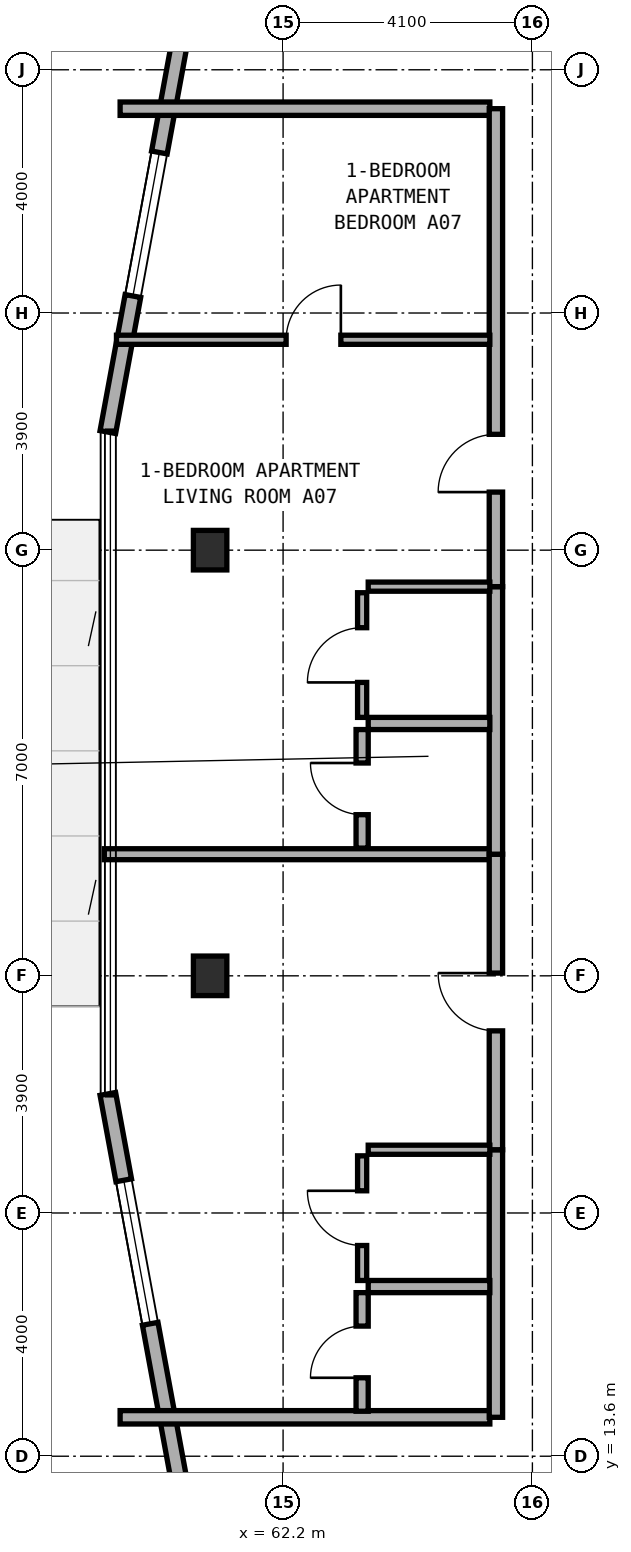
"""IFC4 building model, lengths in metres.
Left out: names, types, materials, properties, quantities, classifications, styles, units other than length and angle.
Written with IfcOpenShell. Run it as: python <this file> out.ifc"""

import sys

from ifc_helpers import new_model, si_unit, direction, frame, frame_2d, origin, origin_2d, place, context, subcontext, project, spatial, rectangle, extrude, element, fill, save


model = new_model("IFC4")
c1 = context("Model", 3, precision=1e-05, world=origin(), true_north=direction((0.0, 1.0)))
c2 = subcontext(c1, "Body", "Model", "MODEL_VIEW")
j1 = project(units=[si_unit("LENGTHUNIT", "METRE"), si_unit("PLANEANGLEUNIT", "RADIAN")], contexts=[c1])
p1 = place(None, origin())
s1 = spatial("IfcSite", under=j1, at=p1, CompositionType="ELEMENT")
p2 = place(p1, origin())
s2 = spatial("IfcBuilding", under=s1, at=p2, CompositionType="ELEMENT")
p3 = place(p2, frame((0.0, 0.0, 124.0)))
s3 = spatial("IfcBuildingStorey", under=s2, at=p3, CompositionType="ELEMENT", Elevation=124.0)
for number, where, z_axis, x_axis in (
    (1, (61.0, 21.5, 0.0), (0.0, 0.0, 1.0), (1.0, 0.0, 0.0)),
    (2, (61.0, 28.5, 0.0), (0.0, 0.0, 1.0), (1.0, 0.0, 0.0)),
):
    element("IfcColumn", number, at=place(p3, frame(where, z_axis=z_axis, x_axis=x_axis)), inside=s3, PredefinedType="COLUMN", context=c2, shape_type="SweptSolid", body=[
        extrude(rectangle(XDim=0.55, YDim=0.65, at=origin_2d()), origin(), (0.0, 0.0, 1.0), 3.5),
    ])
p4 = place(p3, frame((60.929, 39.184, 0.0), z_axis=(0.0, 0.0, 1.0), x_axis=(-0.181209963057, -0.983444431215, 0.0)))
e3 = element("IfcWall", 3, at=p4, inside=s3, PredefinedType="STANDARD", context=c2, shape_type="SweptSolid", body=[
    extrude(rectangle(XDim=8.889, YDim=0.26, at=frame_2d((4.445, 0.0))), origin(), (0.0, 0.0, 1.0), 3.25),
])
p5 = place(p4, frame((4.214, 0.0, 0.8)))
e4 = element("IfcOpeningElement", 4, at=p5, cuts=e3, PredefinedType="OPENING", context=c2, shape_type="SweptSolid", body=[
    extrude(rectangle(XDim=2.4, YDim=1.6, at=frame_2d((1.2, 0.8))), frame((0.0, 0.14, 0.0), z_axis=(0.0, -1.0, 0.0), x_axis=(1.0, 0.0, 0.0)), (0.0, 0.0, 1.0), 0.28),
])
p6 = place(p3, frame((59.318, 19.558, 0.0), z_axis=(0.0, 0.0, 1.0), x_axis=(0.181209963057, -0.983444431215, 0.0)))
e5 = element("IfcWall", 5, at=p6, inside=s3, PredefinedType="STANDARD", context=c2, shape_type="SweptSolid", body=[
    extrude(rectangle(XDim=8.889, YDim=0.26, at=frame_2d((4.445, 0.0))), origin(), (0.0, 0.0, 1.0), 3.25),
])
p7 = place(p6, frame((1.444, 0.0, 0.8)))
e6 = element("IfcOpeningElement", 6, at=p7, cuts=e5, PredefinedType="OPENING", context=c2, shape_type="SweptSolid", body=[
    extrude(rectangle(XDim=2.4, YDim=1.6, at=frame_2d((1.2, 0.8))), frame((0.0, 0.14, 0.0), z_axis=(0.0, -1.0, 0.0), x_axis=(1.0, 0.0, 0.0)), (0.0, 0.0, 1.0), 0.28),
])
for number, where, z_axis, x_axis in (
    (7, (59.52, 14.24, 0.0), (0.0, 0.0, 1.0), (1.0, 0.0, 0.0)),
    (8, (59.52, 35.76, 0.0), (0.0, 0.0, 1.0), (1.0, 0.0, 0.0)),
):
    element("IfcWall", number, at=place(p3, frame(where, z_axis=z_axis, x_axis=x_axis)), inside=s3, PredefinedType="SOLIDWALL", context=c2, shape_type="SweptSolid", body=[
        extrude(rectangle(XDim=6.08, YDim=0.22, at=frame_2d((3.04, 0.0))), origin(), (0.0, 0.0, 1.0), 2.945),
    ])
p8 = place(p3, frame((59.26, 23.5, 0.0), z_axis=(0.0, 0.0, 1.0), x_axis=(1.0, 0.0, 0.0)))
e9 = element("IfcWall", 9, at=p8, inside=s3, PredefinedType="SOLIDWALL", context=c2, shape_type="SweptSolid", body=[
    extrude(rectangle(XDim=6.44, YDim=0.18, at=frame_2d((3.22, 0.0))), origin(), (0.0, 0.0, 1.0), 2.945),
])
p9 = place(p3, frame((65.7, 14.24, 0.0), z_axis=(0.0, 0.0, 1.0), x_axis=(0.0, 1.0, 0.0)))
e10 = element("IfcWall", 10, at=p9, inside=s3, PredefinedType="SOLIDWALL", context=c2, shape_type="SweptSolid", body=[
    extrude(rectangle(XDim=4.4, YDim=0.22, at=frame_2d((2.2, 0.0))), origin(), (0.0, 0.0, 1.0), 3.22),
])
p10 = place(p3, frame((65.7, 18.64, 0.0), z_axis=(0.0, 0.0, 1.0), x_axis=(0.0, 1.0, 0.0)))
e11 = element("IfcWall", 11, at=p10, inside=s3, PredefinedType="SOLIDWALL", context=c2, shape_type="SweptSolid", body=[
    extrude(rectangle(XDim=4.86, YDim=0.22, at=frame_2d((2.43, 0.0))), origin(), (0.0, 0.0, 1.0), 2.825),
])
p11 = place(p10, frame((1.955, 0.0, 0.0)))
e12 = element("IfcOpeningElement", 12, at=p11, cuts=e11, PredefinedType="OPENING", context=c2, shape_type="SweptSolid", body=[
    extrude(rectangle(XDim=0.95, YDim=2.1, at=frame_2d((0.475, 1.05))), frame((0.0, 0.12, 0.0), z_axis=(0.0, -1.0, 0.0), x_axis=(1.0, 0.0, 0.0)), (0.0, 0.0, 1.0), 0.24),
])
p12 = place(p3, frame((63.6, 16.39, 0.0), z_axis=(0.0, 0.0, 1.0), x_axis=(1.0, 0.0, 0.0)))
e13 = element("IfcWall", 13, at=p12, inside=s3, PredefinedType="PLUMBINGWALL", context=c2, shape_type="SweptSolid", body=[
    extrude(rectangle(XDim=2.0, YDim=0.2, at=frame_2d((1.0, 0.0))), origin(), (0.0, 0.0, 1.0), 3.22),
])
p13 = place(p3, frame((63.6, 18.64, 0.0), z_axis=(0.0, 0.0, 1.0), x_axis=(1.0, 0.0, 0.0)))
e14 = element("IfcWall", 14, at=p13, inside=s3, PredefinedType="PARTITIONING", context=c2, shape_type="SweptSolid", body=[
    extrude(rectangle(XDim=2.0, YDim=0.15, at=frame_2d((1.0, 0.0))), origin(), (0.0, 0.0, 1.0), 3.22),
])
p14 = place(p3, frame((63.5, 14.34, 0.0), z_axis=(0.0, 0.0, 1.0), x_axis=(0.0, 1.0, 0.0)))
e15 = element("IfcWall", 15, at=p14, inside=s3, PredefinedType="PLUMBINGWALL", context=c2, shape_type="SweptSolid", body=[
    extrude(rectangle(XDim=1.95, YDim=0.2, at=frame_2d((0.975, 0.0))), origin(), (0.0, 0.0, 1.0), 3.22),
])
p15 = place(p14, frame((0.55, 0.0, 0.0)))
e16 = element("IfcOpeningElement", 16, at=p15, cuts=e15, PredefinedType="OPENING", context=c2, shape_type="SweptSolid", body=[
    extrude(rectangle(XDim=0.85, YDim=2.1, at=frame_2d((0.425, 1.05))), frame((0.0, 0.11, 0.0), z_axis=(0.0, -1.0, 0.0), x_axis=(1.0, 0.0, 0.0)), (0.0, 0.0, 1.0), 0.22),
])
p16 = place(p3, frame((63.5, 16.49, 0.0), z_axis=(0.0, 0.0, 1.0), x_axis=(0.0, 1.0, 0.0)))
e17 = element("IfcWall", 17, at=p16, inside=s3, PredefinedType="PARTITIONING", context=c2, shape_type="SweptSolid", body=[
    extrude(rectangle(XDim=2.05, YDim=0.15, at=frame_2d((1.025, 0.0))), origin(), (0.0, 0.0, 1.0), 3.22),
])
p17 = place(p16, frame((0.575, 0.0, 0.0)))
e18 = element("IfcOpeningElement", 18, at=p17, cuts=e17, PredefinedType="OPENING", context=c2, shape_type="SweptSolid", body=[
    extrude(rectangle(XDim=0.9, YDim=2.1, at=frame_2d((0.45, 1.05))), frame((0.0, 0.085, 0.0), z_axis=(0.0, -1.0, 0.0), x_axis=(1.0, 0.0, 0.0)), (0.0, 0.0, 1.0), 0.17),
])
p18 = place(p3, frame((65.7, 23.5, 0.0), z_axis=(0.0, 0.0, 1.0), x_axis=(0.0, 1.0, 0.0)))
e19 = element("IfcWall", 19, at=p18, inside=s3, PredefinedType="SOLIDWALL", context=c2, shape_type="SweptSolid", body=[
    extrude(rectangle(XDim=4.4, YDim=0.22, at=frame_2d((2.2, 0.0))), origin(), (0.0, 0.0, 1.0), 3.22),
])
p19 = place(p3, frame((65.7, 27.9, 0.0), z_axis=(0.0, 0.0, 1.0), x_axis=(0.0, 1.0, 0.0)))
e20 = element("IfcWall", 20, at=p19, inside=s3, PredefinedType="SOLIDWALL", context=c2, shape_type="SweptSolid", body=[
    extrude(rectangle(XDim=7.86, YDim=0.22, at=frame_2d((3.93, 0.0))), origin(), (0.0, 0.0, 1.0), 2.825),
])
p20 = place(p19, frame((1.555, 0.0, 0.0)))
e21 = element("IfcOpeningElement", 21, at=p20, cuts=e20, PredefinedType="OPENING", context=c2, shape_type="SweptSolid", body=[
    extrude(rectangle(XDim=0.95, YDim=2.1, at=frame_2d((0.475, 1.05))), frame((0.0, 0.12, 0.0), z_axis=(0.0, -1.0, 0.0), x_axis=(1.0, 0.0, 0.0)), (0.0, 0.0, 1.0), 0.24),
])
p21 = place(p3, frame((59.46, 31.96, 0.0), z_axis=(0.0, 0.0, 1.0), x_axis=(1.0, 0.0, 0.0)))
e22 = element("IfcWall", 22, at=p21, inside=s3, PredefinedType="PARTITIONING", context=c2, shape_type="SweptSolid", body=[
    extrude(rectangle(XDim=6.14, YDim=0.15, at=frame_2d((3.07, 0.0))), origin(), (0.0, 0.0, 1.0), 2.945),
])
p22 = place(p21, frame((2.79, 0.0, 0.0)))
e23 = element("IfcOpeningElement", 23, at=p22, cuts=e22, PredefinedType="OPENING", context=c2, shape_type="SweptSolid", body=[
    extrude(rectangle(XDim=0.9, YDim=2.1, at=frame_2d((0.45, 1.05))), frame((0.0, 0.085, 0.0), z_axis=(0.0, -1.0, 0.0), x_axis=(1.0, 0.0, 0.0)), (0.0, 0.0, 1.0), 0.17),
])
p23 = place(p3, frame((63.6, 25.65, 0.0), z_axis=(0.0, 0.0, 1.0), x_axis=(1.0, 0.0, 0.0)))
e24 = element("IfcWall", 24, at=p23, inside=s3, PredefinedType="PLUMBINGWALL", context=c2, shape_type="SweptSolid", body=[
    extrude(rectangle(XDim=2.0, YDim=0.2, at=frame_2d((1.0, 0.0))), origin(), (0.0, 0.0, 1.0), 3.22),
])
p24 = place(p3, frame((63.6, 27.9, 0.0), z_axis=(0.0, 0.0, 1.0), x_axis=(1.0, 0.0, 0.0)))
e25 = element("IfcWall", 25, at=p24, inside=s3, PredefinedType="PARTITIONING", context=c2, shape_type="SweptSolid", body=[
    extrude(rectangle(XDim=2.0, YDim=0.15, at=frame_2d((1.0, 0.0))), origin(), (0.0, 0.0, 1.0), 3.22),
])
p25 = place(p3, frame((63.5, 23.6, 0.0), z_axis=(0.0, 0.0, 1.0), x_axis=(0.0, 1.0, 0.0)))
e26 = element("IfcWall", 26, at=p25, inside=s3, PredefinedType="PLUMBINGWALL", context=c2, shape_type="SweptSolid", body=[
    extrude(rectangle(XDim=1.95, YDim=0.2, at=frame_2d((0.975, 0.0))), origin(), (0.0, 0.0, 1.0), 3.22),
])
p26 = place(p25, frame((0.55, 0.0, 0.0)))
e27 = element("IfcOpeningElement", 27, at=p26, cuts=e26, PredefinedType="OPENING", context=c2, shape_type="SweptSolid", body=[
    extrude(rectangle(XDim=0.85, YDim=2.1, at=frame_2d((0.425, 1.05))), frame((0.0, 0.11, 0.0), z_axis=(0.0, -1.0, 0.0), x_axis=(1.0, 0.0, 0.0)), (0.0, 0.0, 1.0), 0.22),
])
p27 = place(p3, frame((63.5, 25.75, 0.0), z_axis=(0.0, 0.0, 1.0), x_axis=(0.0, 1.0, 0.0)))
e28 = element("IfcWall", 28, at=p27, inside=s3, PredefinedType="PARTITIONING", context=c2, shape_type="SweptSolid", body=[
    extrude(rectangle(XDim=2.05, YDim=0.15, at=frame_2d((1.025, 0.0))), origin(), (0.0, 0.0, 1.0), 3.22),
])
p28 = place(p27, frame((0.575, 0.0, 0.0)))
e29 = element("IfcOpeningElement", 29, at=p28, cuts=e28, PredefinedType="OPENING", context=c2, shape_type="SweptSolid", body=[
    extrude(rectangle(XDim=0.9, YDim=2.1, at=frame_2d((0.45, 1.05))), frame((0.0, 0.085, 0.0), z_axis=(0.0, -1.0, 0.0), x_axis=(1.0, 0.0, 0.0)), (0.0, 0.0, 1.0), 0.17),
])
p29 = place(p5, origin())
e30 = element("IfcWindow", 30, at=p29, inside=s3, PartitioningType="SINGLE_PANEL", PredefinedType="WINDOW", context=c2, shape_type="SweptSolid", body=[
    extrude(rectangle(XDim=2.4, YDim=1.6, at=frame_2d((1.2, 0.8))), frame((0.0, 0.03, 0.0), z_axis=(0.0, -1.0, 0.0), x_axis=(1.0, 0.0, 0.0)), (0.0, 0.0, 1.0), 0.06),
])
fill(e4, e30)
p30 = place(p7, origin())
e31 = element("IfcWindow", 31, at=p30, inside=s3, PartitioningType="SINGLE_PANEL", PredefinedType="WINDOW", context=c2, shape_type="SweptSolid", body=[
    extrude(rectangle(XDim=2.4, YDim=1.6, at=frame_2d((1.2, 0.8))), frame((0.0, 0.03, 0.0), z_axis=(0.0, -1.0, 0.0), x_axis=(1.0, 0.0, 0.0)), (0.0, 0.0, 1.0), 0.06),
])
fill(e6, e31)
p31 = place(p11, origin())
e32 = element("IfcDoor", 32, at=p31, inside=s3, OperationType="SINGLE_SWING_RIGHT", PredefinedType="DOOR", context=c2, shape_type="SweptSolid", body=[
    extrude(rectangle(XDim=0.95, YDim=2.1, at=frame_2d((0.475, 1.05))), frame((0.0, 0.025, 0.0), z_axis=(0.0, -1.0, 0.0), x_axis=(1.0, 0.0, 0.0)), (0.0, 0.0, 1.0), 0.05),
])
fill(e12, e32)
p32 = place(p15, origin())
e33 = element("IfcDoor", 33, at=p32, inside=s3, OperationType="SINGLE_SWING_LEFT", PredefinedType="DOOR", context=c2, shape_type="SweptSolid", body=[
    extrude(rectangle(XDim=0.85, YDim=2.1, at=frame_2d((0.425, 1.05))), frame((0.0, 0.025, 0.0), z_axis=(0.0, -1.0, 0.0), x_axis=(1.0, 0.0, 0.0)), (0.0, 0.0, 1.0), 0.05),
])
fill(e16, e33)
p33 = place(p17, origin())
e34 = element("IfcDoor", 34, at=p33, inside=s3, OperationType="SINGLE_SWING_RIGHT", PredefinedType="DOOR", context=c2, shape_type="SweptSolid", body=[
    extrude(rectangle(XDim=0.9, YDim=2.1, at=frame_2d((0.45, 1.05))), frame((0.0, 0.025, 0.0), z_axis=(0.0, -1.0, 0.0), x_axis=(1.0, 0.0, 0.0)), (0.0, 0.0, 1.0), 0.05),
])
fill(e18, e34)
p34 = place(p20, origin())
e35 = element("IfcDoor", 35, at=p34, inside=s3, OperationType="SINGLE_SWING_LEFT", PredefinedType="DOOR", context=c2, shape_type="SweptSolid", body=[
    extrude(rectangle(XDim=0.95, YDim=2.1, at=frame_2d((0.475, 1.05))), frame((0.0, 0.025, 0.0), z_axis=(0.0, -1.0, 0.0), x_axis=(1.0, 0.0, 0.0)), (0.0, 0.0, 1.0), 0.05),
])
fill(e21, e35)
p35 = place(p22, origin())
e36 = element("IfcDoor", 36, at=p35, inside=s3, OperationType="SINGLE_SWING_RIGHT", PredefinedType="DOOR", context=c2, shape_type="SweptSolid", body=[
    extrude(rectangle(XDim=0.9, YDim=2.1, at=frame_2d((0.45, 1.05))), frame((0.0, 0.025, 0.0), z_axis=(0.0, -1.0, 0.0), x_axis=(1.0, 0.0, 0.0)), (0.0, 0.0, 1.0), 0.05),
])
fill(e23, e36)
p36 = place(p26, origin())
e37 = element("IfcDoor", 37, at=p36, inside=s3, OperationType="SINGLE_SWING_RIGHT", PredefinedType="DOOR", context=c2, shape_type="SweptSolid", body=[
    extrude(rectangle(XDim=0.85, YDim=2.1, at=frame_2d((0.425, 1.05))), frame((0.0, 0.025, 0.0), z_axis=(0.0, -1.0, 0.0), x_axis=(1.0, 0.0, 0.0)), (0.0, 0.0, 1.0), 0.05),
])
fill(e27, e37)
p37 = place(p28, origin())
e38 = element("IfcDoor", 38, at=p37, inside=s3, OperationType="SINGLE_SWING_LEFT", PredefinedType="DOOR", context=c2, shape_type="SweptSolid", body=[
    extrude(rectangle(XDim=0.9, YDim=2.1, at=frame_2d((0.45, 1.05))), frame((0.0, 0.025, 0.0), z_axis=(0.0, -1.0, 0.0), x_axis=(1.0, 0.0, 0.0)), (0.0, 0.0, 1.0), 0.05),
])
fill(e29, e38)
save(model, sys.argv[1])
